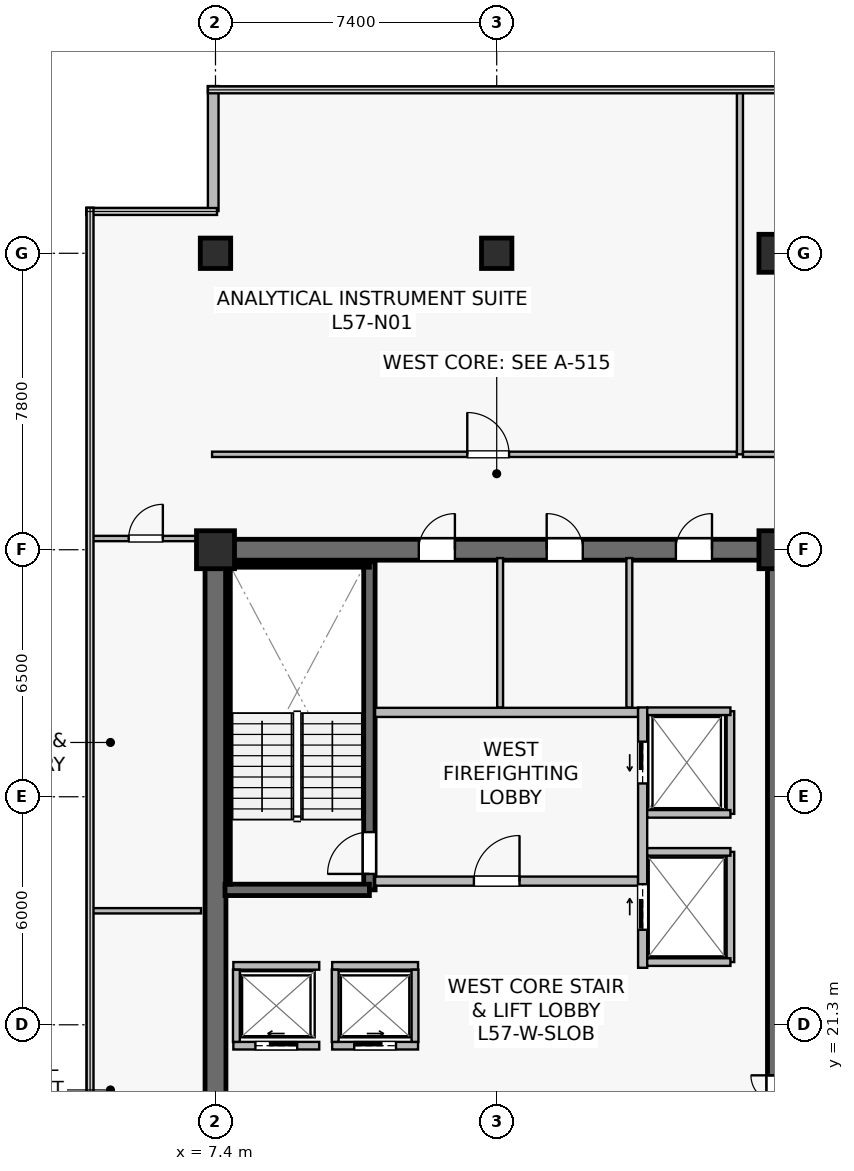
"""IFC4 building model, lengths in metres.
Left out: names, types, materials, properties, quantities, classifications, styles, units other than length and angle.
Written with IfcOpenShell. Run it as: python <this file> out.ifc"""

import sys

from ifc_helpers import new_model, si_unit, direction, frame, frame_2d, origin, origin_2d, place, context, subcontext, project, spatial, rectangle, extrude, source, transform, mapped, element, fill, save


model = new_model("IFC4")
c1 = context("Model", 3, precision=1e-05, world=origin(), true_north=direction((0.0, 1.0)))
c2 = subcontext(c1, "Body", "Model", "MODEL_VIEW")
j1 = project(units=[si_unit("LENGTHUNIT", "METRE"), si_unit("PLANEANGLEUNIT", "RADIAN")], contexts=[c1])
p1 = place(None, origin())
s1 = spatial("IfcSite", under=j1, at=p1, CompositionType="ELEMENT")
p2 = place(p1, origin())
s2 = spatial("IfcBuilding", under=s1, at=p2, CompositionType="ELEMENT")
p3 = place(p2, frame((0.0, 0.0, 238.3)))
s3 = spatial("IfcBuildingStorey", under=s2, at=p3, CompositionType="ELEMENT", Elevation=238.3)
p4 = place(p3, frame((7.125, 33.8, 0.0), z_axis=(0.0, 0.0, 1.0), x_axis=(1.0, 0.0, 0.0)))
e1 = element("IfcWall", 1, at=p4, inside=s3, PredefinedType="SHEAR", context=c2, shape_type="SweptSolid", body=[
    extrude(rectangle(XDim=15.35, YDim=0.55, at=frame_2d((7.675, 0.0))), origin(), (0.0, 0.0, 1.0), 3.8),
])
p5 = place(p4, frame((5.625, 0.0, 0.0)))
e2 = element("IfcOpeningElement", 2, at=p5, cuts=e1, PredefinedType="OPENING", context=c2, shape_type="SweptSolid", body=[
    extrude(rectangle(XDim=0.95, YDim=2.15, at=frame_2d((0.475, 1.075))), frame((0.0, 0.285, 0.0), z_axis=(0.0, -1.0, 0.0), x_axis=(1.0, 0.0, 0.0)), (0.0, 0.0, 1.0), 0.57),
])
p6 = place(p4, frame((8.99, 0.0, 0.0)))
e3 = element("IfcOpeningElement", 3, at=p6, cuts=e1, PredefinedType="OPENING", context=c2, shape_type="SweptSolid", body=[
    extrude(rectangle(XDim=0.95, YDim=2.15, at=frame_2d((0.475, 1.075))), frame((0.0, 0.285, 0.0), z_axis=(0.0, -1.0, 0.0), x_axis=(1.0, 0.0, 0.0)), (0.0, 0.0, 1.0), 0.57),
])
p7 = place(p4, frame((12.39, 0.0, 0.0)))
e4 = element("IfcOpeningElement", 4, at=p7, cuts=e1, PredefinedType="OPENING", context=c2, shape_type="SweptSolid", body=[
    extrude(rectangle(XDim=0.95, YDim=2.15, at=frame_2d((0.475, 1.075))), frame((0.0, 0.285, 0.0), z_axis=(0.0, -1.0, 0.0), x_axis=(1.0, 0.0, 0.0)), (0.0, 0.0, 1.0), 0.57),
])
p8 = place(p3, frame((7.4, 15.075, 0.0), z_axis=(0.0, 0.0, 1.0), x_axis=(0.0, 1.0, 0.0)))
e5 = element("IfcWall", 5, at=p8, inside=s3, PredefinedType="SHEAR", context=c2, shape_type="SweptSolid", body=[
    extrude(rectangle(XDim=18.45, YDim=0.55, at=frame_2d((9.225, 0.0))), origin(), (0.0, 0.0, 1.0), 3.8),
])
p9 = place(p3, frame((22.2, 15.075, 0.0), z_axis=(0.0, 0.0, 1.0), x_axis=(0.0, 1.0, 0.0)))
e6 = element("IfcWall", 6, at=p9, inside=s3, PredefinedType="SHEAR", context=c2, shape_type="SweptSolid", body=[
    extrude(rectangle(XDim=18.45, YDim=0.55, at=frame_2d((9.225, 0.0))), origin(), (0.0, 0.0, 1.0), 3.8),
])
p10 = place(p9, frame((3.475, 0.0, 0.0)))
e7 = element("IfcOpeningElement", 7, at=p10, cuts=e6, PredefinedType="OPENING", context=c2, shape_type="SweptSolid", body=[
    extrude(rectangle(XDim=1.42, YDim=2.2, at=frame_2d((0.71, 1.1))), frame((0.0, 0.285, 0.0), z_axis=(0.0, -1.0, 0.0), x_axis=(1.0, 0.0, 0.0)), (0.0, 0.0, 1.0), 0.57),
])
p11 = place(p3, frame((11.45, 24.85, 0.0), z_axis=(0.0, 0.0, 1.0), x_axis=(0.0, 1.0, 0.0)))
e8 = element("IfcWall", 8, at=p11, inside=s3, PredefinedType="SHEAR", context=c2, shape_type="SweptSolid", body=[
    extrude(rectangle(XDim=8.63, YDim=0.3, at=frame_2d((4.315, 0.0))), origin(), (0.0, 0.0, 1.0), 3.8),
])
p12 = place(p11, frame((0.42, 0.0, 0.0)))
e9 = element("IfcOpeningElement", 9, at=p12, cuts=e8, PredefinedType="OPENING", context=c2, shape_type="SweptSolid", body=[
    extrude(rectangle(XDim=1.1, YDim=2.15, at=frame_2d((0.55, 1.075))), frame((0.0, 0.16, 0.0), z_axis=(0.0, -1.0, 0.0), x_axis=(1.0, 0.0, 0.0)), (0.0, 0.0, 1.0), 0.32),
])
p13 = place(p3, frame((7.65, 24.85, 0.0), z_axis=(0.0, 0.0, 1.0), x_axis=(1.0, 0.0, 0.0)))
e10 = element("IfcWall", 10, at=p13, inside=s3, PredefinedType="SHEAR", context=c2, shape_type="SweptSolid", body=[
    extrude(rectangle(XDim=3.8, YDim=0.3, at=frame_2d((1.9, 0.0))), origin(), (0.0, 0.0, 1.0), 3.8),
])
p14 = place(p3, frame((7.73, 33.4, 0.0), z_axis=(0.0, 0.0, 1.0), x_axis=(1.0, 0.0, 0.0)))
e11 = element("IfcWall", 11, at=p14, inside=s3, PredefinedType="SOLIDWALL", context=c2, shape_type="SweptSolid", body=[
    extrude(rectangle(XDim=3.72, YDim=0.12, at=frame_2d((1.86, 0.0))), origin(), (0.0, 0.0, 1.0), 3.8),
])
p15 = place(p3, frame((7.73, 25.0, 0.0), z_axis=(0.0, 0.0, 1.0), x_axis=(0.0, 1.0, 0.0)))
e12 = element("IfcWall", 12, at=p15, inside=s3, PredefinedType="SOLIDWALL", context=c2, shape_type="SweptSolid", body=[
    extrude(rectangle(XDim=8.32, YDim=0.12, at=frame_2d((4.16, 0.0))), origin(), (0.0, 0.0, 1.0), 3.8),
])
m1 = source(origin(), c2, "Body", "SweptSolid", [
    extrude(rectangle(XDim=1.0, YDim=1.0, at=origin_2d()), origin(), (0.0, 0.0, 1.0), 4.1),
])
for number, where, z_axis, x_axis in (
    (13, (7.4, 33.8, 0.0), (0.0, 0.0, 1.0), (1.0, 0.0, 0.0)),
    (14, (22.2, 33.8, 0.0), (0.0, 0.0, 1.0), (1.0, 0.0, 0.0)),
):
    element("IfcColumn", number, at=place(p3, frame(where, z_axis=z_axis, x_axis=x_axis)), inside=s3, PredefinedType="COLUMN", context=c2, shape_type="MappedRepresentation", body=[
        mapped(m1, transform((0.0, 0.0, 0.0), scale=1.0)),
    ])
m2 = source(origin(), c2, "Body", "SweptSolid", [
    extrude(rectangle(XDim=0.8, YDim=0.8, at=origin_2d()), origin(), (0.0, 0.0, 1.0), 4.1),
])
p16 = place(p3, frame((14.8, 41.6, 0.0), z_axis=(0.0, 0.0, 1.0), x_axis=(1.0, 0.0, 0.0)))
e15 = element("IfcColumn", 15, at=p16, inside=s3, PredefinedType="COLUMN", context=c2, shape_type="MappedRepresentation", body=[
    mapped(m2, transform((0.0, 0.0, 0.0), scale=1.0)),
])
p17 = place(p3, frame((22.2, 41.6, 0.0), z_axis=(0.0, 0.0, 1.0), x_axis=(1.0, 0.0, 0.0)))
e16 = element("IfcColumn", 16, at=p17, inside=s3, PredefinedType="COLUMN", context=c2, shape_type="MappedRepresentation", body=[
    mapped(m1, transform((0.0, 0.0, 0.0), scale=1.0)),
])
p18 = place(p3, frame((7.4, 41.6, 0.0), z_axis=(0.0, 0.0, 1.0), x_axis=(1.0, 0.0, 0.0)))
e17 = element("IfcColumn", 17, at=p18, inside=s3, PredefinedType="COLUMN", context=c2, shape_type="MappedRepresentation", body=[
    mapped(m2, transform((0.0, 0.0, 0.0), scale=1.0)),
])
p19 = place(p3, frame((7.34, 46.0, 0.0), z_axis=(0.0, 0.0, 1.0), x_axis=(0.0, -1.0, 0.0)))
e18 = element("IfcWall", 18, at=p19, inside=s3, PredefinedType="STANDARD", context=c2, shape_type="SweptSolid", body=[
    extrude(rectangle(XDim=3.288, YDim=0.28, at=frame_2d((1.644, 0.0))), origin(), (0.0, 0.0, 1.0), 3.8),
])
p20 = place(p3, frame((11.6, 25.08, 0.0), z_axis=(0.0, 0.0, 1.0), x_axis=(1.0, 0.0, 0.0)))
e19 = element("IfcWall", 19, at=p20, inside=s3, PredefinedType="SOLIDWALL", context=c2, shape_type="SweptSolid", body=[
    extrude(rectangle(XDim=6.92, YDim=0.24, at=frame_2d((3.46, 0.0))), origin(), (0.0, 0.0, 1.0), 3.197),
])
p21 = place(p20, frame((2.6, 0.0, 0.0)))
e20 = element("IfcOpeningElement", 20, at=p21, cuts=e19, PredefinedType="OPENING", context=c2, shape_type="SweptSolid", body=[
    extrude(rectangle(XDim=1.2, YDim=2.16, at=frame_2d((0.6, 1.08))), frame((0.0, 0.13, 0.0), z_axis=(0.0, -1.0, 0.0), x_axis=(1.0, 0.0, 0.0)), (0.0, 0.0, 1.0), 0.26),
])
p22 = place(p3, frame((11.6, 29.52, 0.0), z_axis=(0.0, 0.0, 1.0), x_axis=(1.0, 0.0, 0.0)))
e21 = element("IfcWall", 21, at=p22, inside=s3, PredefinedType="SOLIDWALL", context=c2, shape_type="SweptSolid", body=[
    extrude(rectangle(XDim=6.92, YDim=0.24, at=frame_2d((3.46, 0.0))), origin(), (0.0, 0.0, 1.0), 3.197),
])
p23 = place(p3, frame((18.64, 22.8, 0.0), z_axis=(0.0, 0.0, 1.0), x_axis=(0.0, 1.0, 0.0)))
e22 = element("IfcWall", 22, at=p23, inside=s3, PredefinedType="SOLIDWALL", context=c2, shape_type="SweptSolid", body=[
    extrude(rectangle(XDim=6.85, YDim=0.24, at=frame_2d((3.425, 0.0))), origin(), (0.0, 0.0, 1.0), 2.935),
])
p24 = place(p23, frame((4.85, 0.0, 0.0)))
e23 = element("IfcOpeningElement", 23, at=p24, cuts=e22, PredefinedType="OPENING", context=c2, shape_type="SweptSolid", body=[
    extrude(rectangle(XDim=1.1, YDim=2.22, at=frame_2d((0.55, 1.11))), frame((0.0, 0.13, 0.0), z_axis=(0.0, -1.0, 0.0), x_axis=(1.0, 0.0, 0.0)), (0.0, 0.0, 1.0), 0.26),
])
p25 = place(p23, frame((1.0, 0.0, 0.0)))
e24 = element("IfcOpeningElement", 24, at=p25, cuts=e22, PredefinedType="OPENING", context=c2, shape_type="SweptSolid", body=[
    extrude(rectangle(XDim=1.2, YDim=2.22, at=frame_2d((0.6, 1.11))), frame((0.0, 0.13, 0.0), z_axis=(0.0, -1.0, 0.0), x_axis=(1.0, 0.0, 0.0)), (0.0, 0.0, 1.0), 0.26),
])
p26 = place(p3, frame((7.87, 20.75, 0.0), z_axis=(0.0, 0.0, 1.0), x_axis=(1.0, 0.0, 0.0)))
e25 = element("IfcWall", 25, at=p26, inside=s3, PredefinedType="SOLIDWALL", context=c2, shape_type="SweptSolid", body=[
    extrude(rectangle(XDim=2.26, YDim=0.2, at=frame_2d((1.13, 0.0))), origin(), (0.0, 0.0, 1.0), 3.8),
])
p27 = place(p26, frame((0.58, 0.0, 0.0)))
e26 = element("IfcOpeningElement", 26, at=p27, cuts=e25, PredefinedType="OPENING", context=c2, shape_type="SweptSolid", body=[
    extrude(rectangle(XDim=1.1, YDim=2.22, at=frame_2d((0.55, 1.11))), frame((0.0, 0.11, 0.0), z_axis=(0.0, -1.0, 0.0), x_axis=(1.0, 0.0, 0.0)), (0.0, 0.0, 1.0), 0.22),
])
p28 = place(p3, frame((7.87, 22.85, 0.0), z_axis=(0.0, 0.0, 1.0), x_axis=(1.0, 0.0, 0.0)))
e27 = element("IfcWall", 27, at=p28, inside=s3, PredefinedType="SOLIDWALL", context=c2, shape_type="SweptSolid", body=[
    extrude(rectangle(XDim=2.26, YDim=0.2, at=frame_2d((1.13, 0.0))), origin(), (0.0, 0.0, 1.0), 3.8),
])
p29 = place(p3, frame((7.95, 20.85, 0.0), z_axis=(0.0, 0.0, 1.0), x_axis=(0.0, 1.0, 0.0)))
e28 = element("IfcWall", 28, at=p29, inside=s3, PredefinedType="SOLIDWALL", context=c2, shape_type="SweptSolid", body=[
    extrude(rectangle(XDim=1.9, YDim=0.18, at=frame_2d((0.95, 0.0))), origin(), (0.0, 0.0, 1.0), 3.8),
])
p30 = place(p3, frame((10.47, 20.75, 0.0), z_axis=(0.0, 0.0, 1.0), x_axis=(1.0, 0.0, 0.0)))
e29 = element("IfcWall", 29, at=p30, inside=s3, PredefinedType="SOLIDWALL", context=c2, shape_type="SweptSolid", body=[
    extrude(rectangle(XDim=2.26, YDim=0.2, at=frame_2d((1.13, 0.0))), origin(), (0.0, 0.0, 1.0), 3.8),
])
p31 = place(p30, frame((0.58, 0.0, 0.0)))
e30 = element("IfcOpeningElement", 30, at=p31, cuts=e29, PredefinedType="OPENING", context=c2, shape_type="SweptSolid", body=[
    extrude(rectangle(XDim=1.1, YDim=2.22, at=frame_2d((0.55, 1.11))), frame((0.0, 0.11, 0.0), z_axis=(0.0, -1.0, 0.0), x_axis=(1.0, 0.0, 0.0)), (0.0, 0.0, 1.0), 0.22),
])
p32 = place(p3, frame((10.47, 22.85, 0.0), z_axis=(0.0, 0.0, 1.0), x_axis=(1.0, 0.0, 0.0)))
e31 = element("IfcWall", 31, at=p32, inside=s3, PredefinedType="SOLIDWALL", context=c2, shape_type="SweptSolid", body=[
    extrude(rectangle(XDim=2.26, YDim=0.2, at=frame_2d((1.13, 0.0))), origin(), (0.0, 0.0, 1.0), 3.8),
])
for number, where, z_axis, x_axis in (
    (32, (10.55, 20.85, 0.0), (0.0, 0.0, 1.0), (0.0, 1.0, 0.0)),
    (33, (12.65, 20.85, 0.0), (0.0, 0.0, 1.0), (0.0, 1.0, 0.0)),
):
    element("IfcWall", number, at=place(p3, frame(where, z_axis=z_axis, x_axis=x_axis)), inside=s3, PredefinedType="SOLIDWALL", context=c2, shape_type="SweptSolid", body=[
        extrude(rectangle(XDim=1.9, YDim=0.18, at=frame_2d((0.95, 0.0))), origin(), (0.0, 0.0, 1.0), 3.8),
    ])
p33 = place(p3, frame((20.95, 26.85, 0.0), z_axis=(0.0, 0.0, 1.0), x_axis=(0.0, 1.0, 0.0)))
e34 = element("IfcWall", 34, at=p33, inside=s3, PredefinedType="SOLIDWALL", context=c2, shape_type="SweptSolid", body=[
    extrude(rectangle(XDim=2.7, YDim=0.2, at=frame_2d((1.35, 0.0))), origin(), (0.0, 0.0, 1.0), 3.8),
])
p34 = place(p3, frame((18.76, 29.55, 0.0), z_axis=(0.0, 0.0, 1.0), x_axis=(1.0, 0.0, 0.0)))
e35 = element("IfcWall", 35, at=p34, inside=s3, PredefinedType="SOLIDWALL", context=c2, shape_type="SweptSolid", body=[
    extrude(rectangle(XDim=2.19, YDim=0.2, at=frame_2d((1.095, 0.0))), origin(), (0.0, 0.0, 1.0), 3.8),
])
p35 = place(p3, frame((18.76, 26.85, 0.0), z_axis=(0.0, 0.0, 1.0), x_axis=(1.0, 0.0, 0.0)))
e36 = element("IfcWall", 36, at=p35, inside=s3, PredefinedType="SOLIDWALL", context=c2, shape_type="SweptSolid", body=[
    extrude(rectangle(XDim=2.19, YDim=0.2, at=frame_2d((1.095, 0.0))), origin(), (0.0, 0.0, 1.0), 3.197),
])
p36 = place(p3, frame((20.95, 22.95, 0.0), z_axis=(0.0, 0.0, 1.0), x_axis=(0.0, 1.0, 0.0)))
e37 = element("IfcWall", 37, at=p36, inside=s3, PredefinedType="SOLIDWALL", context=c2, shape_type="SweptSolid", body=[
    extrude(rectangle(XDim=2.9, YDim=0.2, at=frame_2d((1.45, 0.0))), origin(), (0.0, 0.0, 1.0), 2.935),
])
for number, where, z_axis, x_axis in (
    (38, (18.76, 25.85, 0.0), (0.0, 0.0, 1.0), (1.0, 0.0, 0.0)),
    (39, (18.76, 22.95, 0.0), (0.0, 0.0, 1.0), (1.0, 0.0, 0.0)),
):
    element("IfcWall", number, at=place(p3, frame(where, z_axis=z_axis, x_axis=x_axis)), inside=s3, PredefinedType="SOLIDWALL", context=c2, shape_type="SweptSolid", body=[
        extrude(rectangle(XDim=2.19, YDim=0.2, at=frame_2d((1.095, 0.0))), origin(), (0.0, 0.0, 1.0), 3.8),
    ])
p37 = place(p3, frame((14.89, 29.65, 0.0), z_axis=(0.0, 0.0, 1.0), x_axis=(0.0, 1.0, 0.0)))
e40 = element("IfcWall", 40, at=p37, inside=s3, PredefinedType="PLUMBINGWALL", context=c2, shape_type="SweptSolid", body=[
    extrude(rectangle(XDim=3.93, YDim=0.155, at=frame_2d((1.965, 0.0))), origin(), (0.0, 0.0, 1.0), 3.197),
])
p38 = place(p3, frame((18.29, 29.65, 0.0), z_axis=(0.0, 0.0, 1.0), x_axis=(0.0, 1.0, 0.0)))
e41 = element("IfcWall", 41, at=p38, inside=s3, PredefinedType="PLUMBINGWALL", context=c2, shape_type="SweptSolid", body=[
    extrude(rectangle(XDim=3.93, YDim=0.155, at=frame_2d((1.965, 0.0))), origin(), (0.0, 0.0, 1.0), 3.8),
])
p39 = place(p3, frame((7.31, 36.31, 0.0), z_axis=(0.0, 0.0, 1.0), x_axis=(1.0, 0.0, 0.0)))
e42 = element("IfcWall", 42, at=p39, inside=s3, PredefinedType="PARTITIONING", context=c2, shape_type="SweptSolid", body=[
    extrude(rectangle(XDim=13.81, YDim=0.14, at=frame_2d((6.905, 0.0))), origin(), (0.0, 0.0, 1.0), 3.197),
])
p40 = place(p39, frame((6.715, 0.0, 0.0)))
e43 = element("IfcOpeningElement", 43, at=p40, cuts=e42, PredefinedType="OPENING", context=c2, shape_type="SweptSolid", body=[
    extrude(rectangle(XDim=1.1, YDim=2.18, at=frame_2d((0.55, 1.09))), frame((0.0, 0.08, 0.0), z_axis=(0.0, -1.0, 0.0), x_axis=(1.0, 0.0, 0.0)), (0.0, 0.0, 1.0), 0.16),
])
p41 = place(p3, frame((21.2, 36.31, 0.0), z_axis=(0.0, 0.0, 1.0), x_axis=(0.0, 1.0, 0.0)))
e44 = element("IfcWall", 44, at=p41, inside=s3, PredefinedType="PARTITIONING", context=c2, shape_type="SweptSolid", body=[
    extrude(rectangle(XDim=9.58, YDim=0.16, at=frame_2d((4.79, 0.0))), origin(), (0.0, 0.0, 1.0), 3.135),
])
p42 = place(p3, frame((21.28, 36.31, 0.0), z_axis=(0.0, 0.0, 1.0), x_axis=(1.0, 0.0, 0.0)))
e45 = element("IfcWall", 45, at=p42, inside=s3, PredefinedType="PARTITIONING", context=c2, shape_type="SweptSolid", body=[
    extrude(rectangle(XDim=23.24, YDim=0.14, at=frame_2d((11.62, 0.0))), origin(), (0.0, 0.0, 1.0), 3.197),
])
p43 = place(p42, frame((9.14, 0.0, 0.0)))
e46 = element("IfcOpeningElement", 46, at=p43, cuts=e45, PredefinedType="OPENING", context=c2, shape_type="SweptSolid", body=[
    extrude(rectangle(XDim=1.1, YDim=2.18, at=frame_2d((0.55, 1.09))), frame((0.0, 0.08, 0.0), z_axis=(0.0, -1.0, 0.0), x_axis=(1.0, 0.0, 0.0)), (0.0, 0.0, 1.0), 0.16),
])
p44 = place(p3, frame((4.11, 24.3, 0.0), z_axis=(0.0, 0.0, 1.0), x_axis=(1.0, 0.0, 0.0)))
e47 = element("IfcWall", 47, at=p44, inside=s3, PredefinedType="PARTITIONING", context=c2, shape_type="SweptSolid", body=[
    extrude(rectangle(XDim=2.91, YDim=0.14, at=frame_2d((1.455, 0.0))), origin(), (0.0, 0.0, 1.0), 3.8),
])
p45 = place(p3, frame((4.11, 34.095, 0.0), z_axis=(0.0, 0.0, 1.0), x_axis=(1.0, 0.0, 0.0)))
e48 = element("IfcWall", 48, at=p45, inside=s3, PredefinedType="PARTITIONING", context=c2, shape_type="SweptSolid", body=[
    extrude(rectangle(XDim=2.91, YDim=0.14, at=frame_2d((1.455, 0.0))), origin(), (0.0, 0.0, 1.0), 3.8),
])
p46 = place(p45, frame((1.005, 0.0, 0.0)))
e49 = element("IfcOpeningElement", 49, at=p46, cuts=e48, PredefinedType="OPENING", context=c2, shape_type="SweptSolid", body=[
    extrude(rectangle(XDim=0.9, YDim=2.1, at=frame_2d((0.45, 1.05))), frame((0.0, 0.08, 0.0), z_axis=(0.0, -1.0, 0.0), x_axis=(1.0, 0.0, 0.0)), (0.0, 0.0, 1.0), 0.16),
])
m3 = source(origin(), c2, "Body", "SweptSolid", [
    extrude(rectangle(XDim=1.1, YDim=2.15, at=frame_2d((0.55, 1.075))), frame((0.0, 0.025, 0.0), z_axis=(0.0, -1.0, 0.0), x_axis=(1.0, 0.0, 0.0)), (0.0, 0.0, 1.0), 0.05),
])
p47 = place(p12, origin())
e50 = element("IfcDoor", 50, at=p47, inside=s3, OperationType="SINGLE_SWING_LEFT", PredefinedType="DOOR", context=c2, shape_type="MappedRepresentation", body=[
    mapped(m3, transform((0.0, 0.0, 0.0), scale=1.0)),
])
fill(e9, e50)
m4 = source(origin(), c2, "Body", "SweptSolid", [
    extrude(rectangle(XDim=1.2, YDim=2.16, at=frame_2d((0.6, 1.08))), frame((0.0, 0.025, 0.0), z_axis=(0.0, -1.0, 0.0), x_axis=(1.0, 0.0, 0.0)), (0.0, 0.0, 1.0), 0.05),
])
p48 = place(p21, origin())
e51 = element("IfcDoor", 51, at=p48, inside=s3, OperationType="SINGLE_SWING_RIGHT", PredefinedType="DOOR", context=c2, shape_type="MappedRepresentation", body=[
    mapped(m4, transform((0.0, 0.0, 0.0), scale=1.0)),
])
fill(e20, e51)
m5 = source(origin(), c2, "Body", "SweptSolid", [
    extrude(rectangle(XDim=1.1, YDim=2.22, at=frame_2d((0.55, 1.11))), frame((0.0, 0.025, 0.0), z_axis=(0.0, -1.0, 0.0), x_axis=(1.0, 0.0, 0.0)), (0.0, 0.0, 1.0), 0.05),
])
p49 = place(p27, origin())
e52 = element("IfcDoor", 52, at=p49, inside=s3, OperationType="SLIDING_TO_LEFT", PredefinedType="USERDEFINED", context=c2, shape_type="MappedRepresentation", body=[
    mapped(m5, transform((0.0, 0.0, 0.0), scale=1.0)),
])
fill(e26, e52)
p50 = place(p31, origin())
e53 = element("IfcDoor", 53, at=p50, inside=s3, OperationType="SLIDING_TO_RIGHT", PredefinedType="USERDEFINED", context=c2, shape_type="MappedRepresentation", body=[
    mapped(m5, transform((0.0, 0.0, 0.0), scale=1.0)),
])
fill(e30, e53)
p51 = place(p24, origin())
e54 = element("IfcDoor", 54, at=p51, inside=s3, OperationType="SLIDING_TO_LEFT", PredefinedType="USERDEFINED", context=c2, shape_type="MappedRepresentation", body=[
    mapped(m5, transform((0.0, 0.0, 0.0), scale=1.0)),
])
fill(e23, e54)
m6 = source(origin(), c2, "Body", "SweptSolid", [
    extrude(rectangle(XDim=1.2, YDim=2.22, at=frame_2d((0.6, 1.11))), frame((0.0, 0.025, 0.0), z_axis=(0.0, -1.0, 0.0), x_axis=(1.0, 0.0, 0.0)), (0.0, 0.0, 1.0), 0.05),
])
p52 = place(p25, origin())
e55 = element("IfcDoor", 55, at=p52, inside=s3, OperationType="SLIDING_TO_RIGHT", PredefinedType="USERDEFINED", context=c2, shape_type="MappedRepresentation", body=[
    mapped(m6, transform((0.0, 0.0, 0.0), scale=1.0)),
])
fill(e24, e55)
m7 = source(origin(), c2, "Body", "SweptSolid", [
    extrude(rectangle(XDim=0.95, YDim=2.15, at=frame_2d((0.475, 1.075))), frame((0.0, 0.025, 0.0), z_axis=(0.0, -1.0, 0.0), x_axis=(1.0, 0.0, 0.0)), (0.0, 0.0, 1.0), 0.05),
])
p53 = place(p5, origin())
e56 = element("IfcDoor", 56, at=p53, inside=s3, OperationType="SINGLE_SWING_RIGHT", PredefinedType="DOOR", context=c2, shape_type="MappedRepresentation", body=[
    mapped(m7, transform((0.0, 0.0, 0.0), scale=1.0)),
])
fill(e2, e56)
p54 = place(p6, origin())
e57 = element("IfcDoor", 57, at=p54, inside=s3, OperationType="SINGLE_SWING_LEFT", PredefinedType="DOOR", context=c2, shape_type="MappedRepresentation", body=[
    mapped(m7, transform((0.0, 0.0, 0.0), scale=1.0)),
])
fill(e3, e57)
p55 = place(p7, origin())
e58 = element("IfcDoor", 58, at=p55, inside=s3, OperationType="SINGLE_SWING_RIGHT", PredefinedType="DOOR", context=c2, shape_type="MappedRepresentation", body=[
    mapped(m7, transform((0.0, 0.0, 0.0), scale=1.0)),
])
fill(e4, e58)
m8 = source(origin(), c2, "Body", "SweptSolid", [
    extrude(rectangle(XDim=1.1, YDim=2.18, at=frame_2d((0.55, 1.09))), frame((0.0, 0.025, 0.0), z_axis=(0.0, -1.0, 0.0), x_axis=(1.0, 0.0, 0.0)), (0.0, 0.0, 1.0), 0.05),
])
p56 = place(p40, origin())
e59 = element("IfcDoor", 59, at=p56, inside=s3, OperationType="SINGLE_SWING_LEFT", PredefinedType="DOOR", context=c2, shape_type="MappedRepresentation", body=[
    mapped(m8, transform((0.0, 0.0, 0.0), scale=1.0)),
])
fill(e43, e59)
m9 = source(origin(), c2, "Body", "SweptSolid", [
    extrude(rectangle(XDim=0.9, YDim=2.1, at=frame_2d((0.45, 1.05))), frame((0.0, 0.025, 0.0), z_axis=(0.0, -1.0, 0.0), x_axis=(1.0, 0.0, 0.0)), (0.0, 0.0, 1.0), 0.05),
])
p57 = place(p46, origin())
e60 = element("IfcDoor", 60, at=p57, inside=s3, OperationType="SINGLE_SWING_RIGHT", PredefinedType="DOOR", context=c2, shape_type="MappedRepresentation", body=[
    mapped(m9, transform((0.0, 0.0, 0.0), scale=1.0)),
])
fill(e49, e60)
save(model, sys.argv[1])
